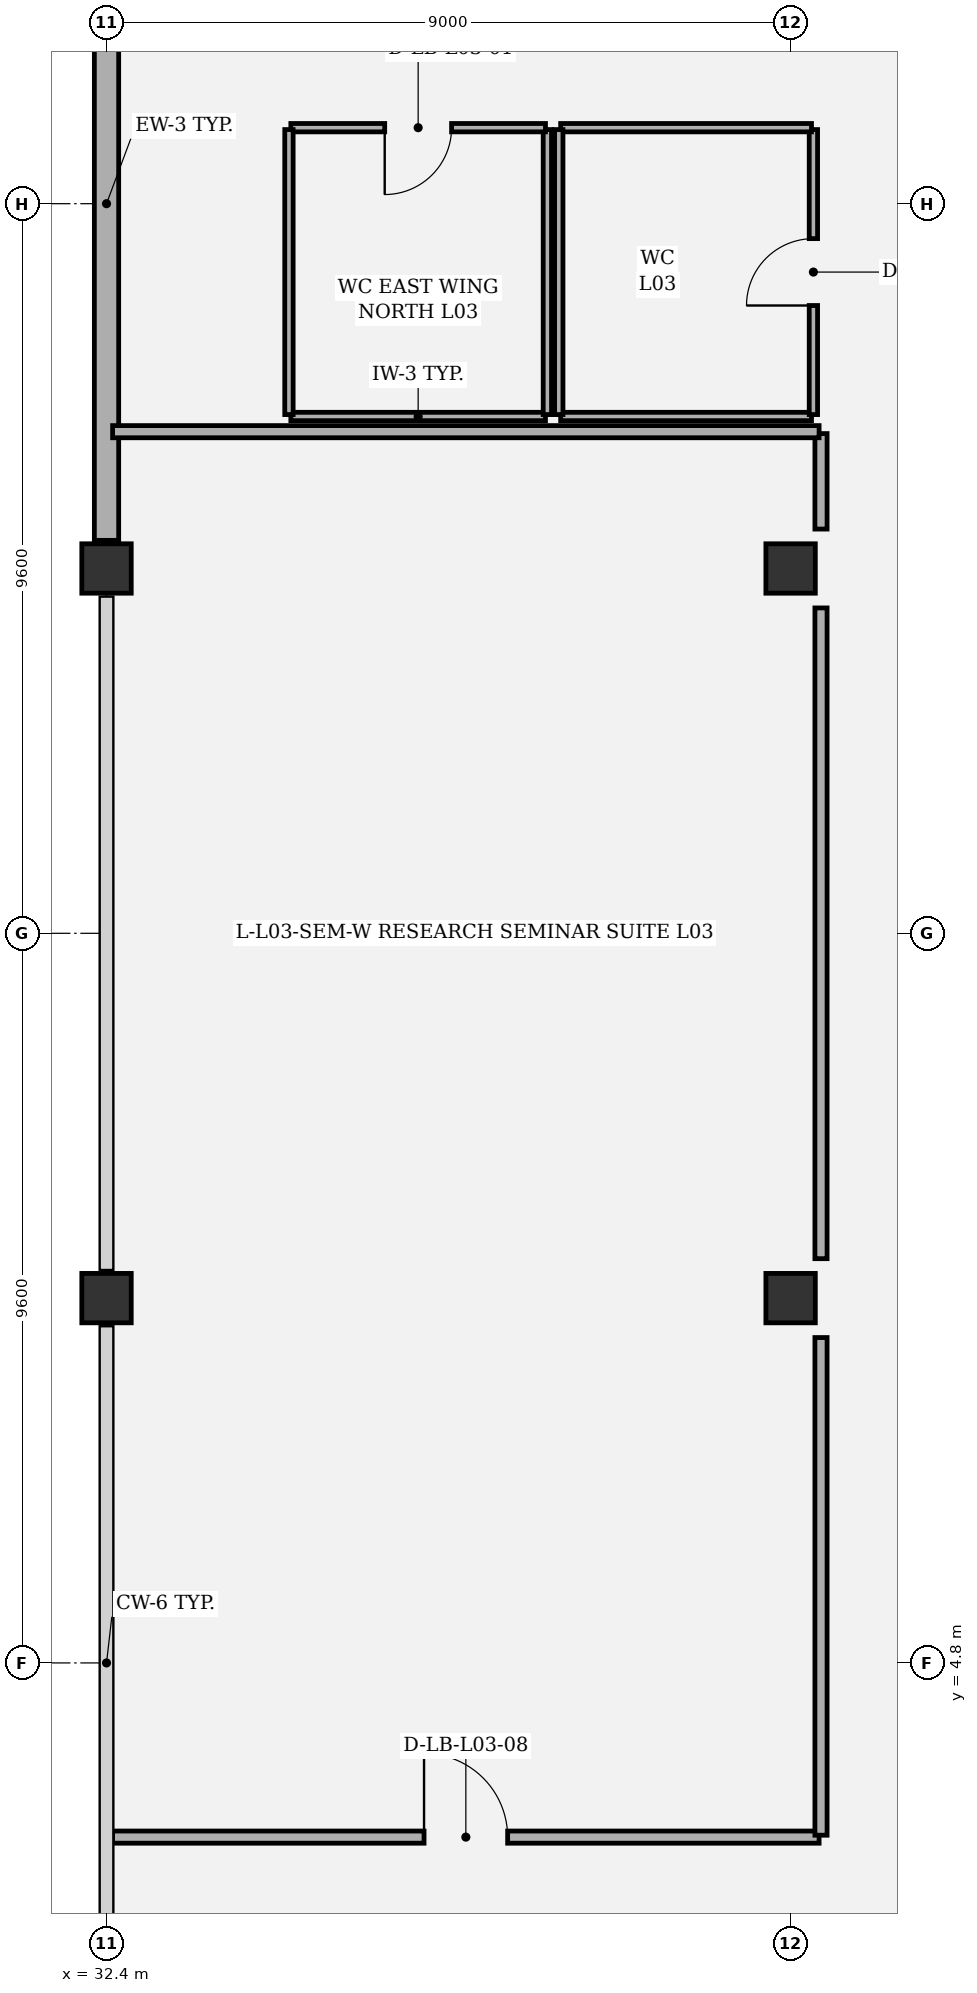
"""IFC4 building model, lengths in metres.
Left out: names, types, materials, properties, quantities, classifications, styles, units other than length and angle.
Written with IfcOpenShell. Run it as: python <this file> out.ifc"""

import sys

from ifc_helpers import new_model, si_unit, direction, frame, frame_2d, origin, origin_2d, place, context, subcontext, project, spatial, rectangle, extrude, element, fill, save


model = new_model("IFC4")
c1 = context("Model", 3, precision=1e-05, world=origin(), true_north=direction((0.0, 1.0)))
c2 = subcontext(c1, "Body", "Model", "MODEL_VIEW")
j1 = project(units=[si_unit("LENGTHUNIT", "METRE"), si_unit("PLANEANGLEUNIT", "RADIAN")], contexts=[c1])
p1 = place(None, origin())
s1 = spatial("IfcSite", under=j1, at=p1, CompositionType="ELEMENT")
p2 = place(p1, origin())
s2 = spatial("IfcBuilding", under=s1, at=p2, CompositionType="ELEMENT")
p3 = place(p2, frame((0.0, 0.0, 17.0)))
s3 = spatial("IfcBuildingStorey", under=s2, at=p3, CompositionType="ELEMENT", Elevation=17.0)
for number, where, z_axis, x_axis in (
    (1, (32.4, 9.6, 0.0), (0.0, 0.0, 1.0), (1.0, 0.0, 0.0)),
    (2, (32.4, 19.2, 0.0), (0.0, 0.0, 1.0), (1.0, 0.0, 0.0)),
    (3, (41.4, 9.6, 0.0), (0.0, 0.0, 1.0), (1.0, 0.0, 0.0)),
    (4, (41.4, 19.2, 0.0), (0.0, 0.0, 1.0), (1.0, 0.0, 0.0)),
):
    element("IfcColumn", number, at=place(p3, frame(where, z_axis=z_axis, x_axis=x_axis)), inside=s3, PredefinedType="COLUMN", context=c2, shape_type="SweptSolid", body=[
        extrude(rectangle(XDim=0.65, YDim=0.65, at=origin_2d()), origin(), (0.0, 0.0, 1.0), 5.0),
    ])
p4 = place(p3, frame((32.4, 19.57, 0.0), z_axis=(0.0, 0.0, 1.0), x_axis=(0.0, 1.0, 0.0)))
e5 = element("IfcWall", 5, at=p4, inside=s3, PredefinedType="SOLIDWALL", context=c2, shape_type="SweptSolid", body=[
    extrude(rectangle(XDim=8.86, YDim=0.32, at=frame_2d((4.43, 0.0))), origin(), (0.0, 0.0, 1.0), 3.937),
])
p5 = place(p3, frame((34.825, 21.2, 0.0), z_axis=(0.0, 0.0, 1.0), x_axis=(1.0, 0.0, 0.0)))
e6 = element("IfcWall", 6, at=p5, inside=s3, PredefinedType="PARTITIONING", context=c2, shape_type="SweptSolid", body=[
    extrude(rectangle(XDim=3.35, YDim=0.11, at=frame_2d((1.675, 0.0))), origin(), (0.0, 0.0, 1.0), 4.74),
])
p6 = place(p3, frame((38.2, 21.225, 0.0), z_axis=(0.0, 0.0, 1.0), x_axis=(0.0, 1.0, 0.0)))
e7 = element("IfcWall", 7, at=p6, inside=s3, PredefinedType="PARTITIONING", context=c2, shape_type="SweptSolid", body=[
    extrude(rectangle(XDim=3.75, YDim=0.11, at=frame_2d((1.875, 0.0))), origin(), (0.0, 0.0, 1.0), 4.74),
])
p7 = place(p3, frame((38.175, 25.0, 0.0), z_axis=(0.0, 0.0, 1.0), x_axis=(-1.0, 0.0, 0.0)))
e8 = element("IfcWall", 8, at=p7, inside=s3, PredefinedType="PARTITIONING", context=c2, shape_type="SweptSolid", body=[
    extrude(rectangle(XDim=3.35, YDim=0.11, at=frame_2d((1.675, 0.0))), origin(), (0.0, 0.0, 1.0), 4.74),
])
p8 = place(p7, frame((1.235, 0.0, 0.0)))
e9 = element("IfcOpeningElement", 9, at=p8, cuts=e8, PredefinedType="OPENING", context=c2, shape_type="SweptSolid", body=[
    extrude(rectangle(XDim=0.88, YDim=2.1, at=frame_2d((0.44, 1.05))), frame((0.0, 0.065, 0.0), z_axis=(0.0, -1.0, 0.0), x_axis=(1.0, 0.0, 0.0)), (0.0, 0.0, 1.0), 0.13),
])
p9 = place(p3, frame((34.8, 24.975, 0.0), z_axis=(0.0, 0.0, 1.0), x_axis=(0.0, -1.0, 0.0)))
e10 = element("IfcWall", 10, at=p9, inside=s3, PredefinedType="PARTITIONING", context=c2, shape_type="SweptSolid", body=[
    extrude(rectangle(XDim=3.75, YDim=0.11, at=frame_2d((1.875, 0.0))), origin(), (0.0, 0.0, 1.0), 4.74),
])
p10 = place(p3, frame((38.375, 21.2, 0.0), z_axis=(0.0, 0.0, 1.0), x_axis=(1.0, 0.0, 0.0)))
e11 = element("IfcWall", 11, at=p10, inside=s3, PredefinedType="PARTITIONING", context=c2, shape_type="SweptSolid", body=[
    extrude(rectangle(XDim=3.3, YDim=0.11, at=frame_2d((1.65, 0.0))), origin(), (0.0, 0.0, 1.0), 4.74),
])
p11 = place(p3, frame((41.7, 21.225, 0.0), z_axis=(0.0, 0.0, 1.0), x_axis=(0.0, 1.0, 0.0)))
e12 = element("IfcWall", 12, at=p11, inside=s3, PredefinedType="PARTITIONING", context=c2, shape_type="SweptSolid", body=[
    extrude(rectangle(XDim=3.75, YDim=0.11, at=frame_2d((1.875, 0.0))), origin(), (0.0, 0.0, 1.0), 4.094),
])
p12 = place(p11, frame((1.435, 0.0, 0.0)))
e13 = element("IfcOpeningElement", 13, at=p12, cuts=e12, PredefinedType="OPENING", context=c2, shape_type="SweptSolid", body=[
    extrude(rectangle(XDim=0.88, YDim=2.1, at=frame_2d((0.44, 1.05))), frame((0.0, 0.065, 0.0), z_axis=(0.0, -1.0, 0.0), x_axis=(1.0, 0.0, 0.0)), (0.0, 0.0, 1.0), 0.13),
])
p13 = place(p3, frame((41.675, 25.0, 0.0), z_axis=(0.0, 0.0, 1.0), x_axis=(-1.0, 0.0, 0.0)))
e14 = element("IfcWall", 14, at=p13, inside=s3, PredefinedType="PARTITIONING", context=c2, shape_type="SweptSolid", body=[
    extrude(rectangle(XDim=3.3, YDim=0.11, at=frame_2d((1.65, 0.0))), origin(), (0.0, 0.0, 1.0), 4.74),
])
p14 = place(p3, frame((38.35, 24.975, 0.0), z_axis=(0.0, 0.0, 1.0), x_axis=(0.0, -1.0, 0.0)))
e15 = element("IfcWall", 15, at=p14, inside=s3, PredefinedType="PARTITIONING", context=c2, shape_type="SweptSolid", body=[
    extrude(rectangle(XDim=3.75, YDim=0.11, at=frame_2d((1.875, 0.0))), origin(), (0.0, 0.0, 1.0), 4.74),
])
p15 = place(p3, frame((32.48, 2.508, 0.0), z_axis=(0.0, 0.0, 1.0), x_axis=(1.0, 0.0, 0.0)))
e16 = element("IfcWall", 16, at=p15, inside=s3, PredefinedType="PARTITIONING", context=c2, shape_type="SweptSolid", body=[
    extrude(rectangle(XDim=9.295, YDim=0.16, at=frame_2d((4.647, 0.0))), origin(), (0.0, 0.0, 1.0), 4.253),
])
p16 = place(p15, frame((4.097, 0.0, 0.0)))
e17 = element("IfcOpeningElement", 17, at=p16, cuts=e16, PredefinedType="OPENING", context=c2, shape_type="SweptSolid", body=[
    extrude(rectangle(XDim=1.1, YDim=2.15, at=frame_2d((0.55, 1.075))), frame((0.0, 0.09, 0.0), z_axis=(0.0, -1.0, 0.0), x_axis=(1.0, 0.0, 0.0)), (0.0, 0.0, 1.0), 0.18),
])
p17 = place(p3, frame((41.8, 2.533, 0.0), z_axis=(0.0, 0.0, 1.0), x_axis=(0.0, 1.0, 0.0)))
e18 = element("IfcWall", 18, at=p17, inside=s3, PredefinedType="PARTITIONING", context=c2, shape_type="SweptSolid", body=[
    extrude(rectangle(XDim=6.548, YDim=0.16, at=frame_2d((3.274, 0.0))), origin(), (0.0, 0.0, 1.0), 4.74),
])
p18 = place(p3, frame((41.8, 10.119, 0.0), z_axis=(0.0, 0.0, 1.0), x_axis=(0.0, 1.0, 0.0)))
e19 = element("IfcWall", 19, at=p18, inside=s3, PredefinedType="PARTITIONING", context=c2, shape_type="SweptSolid", body=[
    extrude(rectangle(XDim=8.562, YDim=0.16, at=frame_2d((4.281, 0.0))), origin(), (0.0, 0.0, 1.0), 4.74),
])
p19 = place(p3, frame((41.8, 19.719, 0.0), z_axis=(0.0, 0.0, 1.0), x_axis=(0.0, 1.0, 0.0)))
e20 = element("IfcWall", 20, at=p19, inside=s3, PredefinedType="PARTITIONING", context=c2, shape_type="SweptSolid", body=[
    extrude(rectangle(XDim=1.256, YDim=0.16, at=frame_2d((0.628, 0.0))), origin(), (0.0, 0.0, 1.0), 4.74),
])
p20 = place(p3, frame((41.775, 21.0, 0.0), z_axis=(0.0, 0.0, 1.0), x_axis=(-1.0, 0.0, 0.0)))
e21 = element("IfcWall", 21, at=p20, inside=s3, PredefinedType="PARTITIONING", context=c2, shape_type="SweptSolid", body=[
    extrude(rectangle(XDim=9.295, YDim=0.16, at=frame_2d((4.647, 0.0))), origin(), (0.0, 0.0, 1.0), 4.74),
])
p21 = place(p8, origin())
e22 = element("IfcDoor", 22, at=p21, inside=s3, OperationType="SINGLE_SWING_RIGHT", PredefinedType="DOOR", context=c2, shape_type="SweptSolid", body=[
    extrude(rectangle(XDim=0.88, YDim=2.1, at=frame_2d((0.44, 1.05))), frame((0.0, 0.025, 0.0), z_axis=(0.0, -1.0, 0.0), x_axis=(1.0, 0.0, 0.0)), (0.0, 0.0, 1.0), 0.05),
])
fill(e9, e22)
p22 = place(p12, origin())
e23 = element("IfcDoor", 23, at=p22, inside=s3, OperationType="SINGLE_SWING_LEFT", PredefinedType="DOOR", context=c2, shape_type="SweptSolid", body=[
    extrude(rectangle(XDim=0.88, YDim=2.1, at=frame_2d((0.44, 1.05))), frame((0.0, 0.025, 0.0), z_axis=(0.0, -1.0, 0.0), x_axis=(1.0, 0.0, 0.0)), (0.0, 0.0, 1.0), 0.05),
])
fill(e13, e23)
p23 = place(p16, origin())
e24 = element("IfcDoor", 24, at=p23, inside=s3, OperationType="SINGLE_SWING_LEFT", PredefinedType="DOOR", context=c2, shape_type="SweptSolid", body=[
    extrude(rectangle(XDim=1.1, YDim=2.15, at=frame_2d((0.55, 1.075))), frame((0.0, 0.025, 0.0), z_axis=(0.0, -1.0, 0.0), x_axis=(1.0, 0.0, 0.0)), (0.0, 0.0, 1.0), 0.05),
])
fill(e17, e24)
save(model, sys.argv[1])
